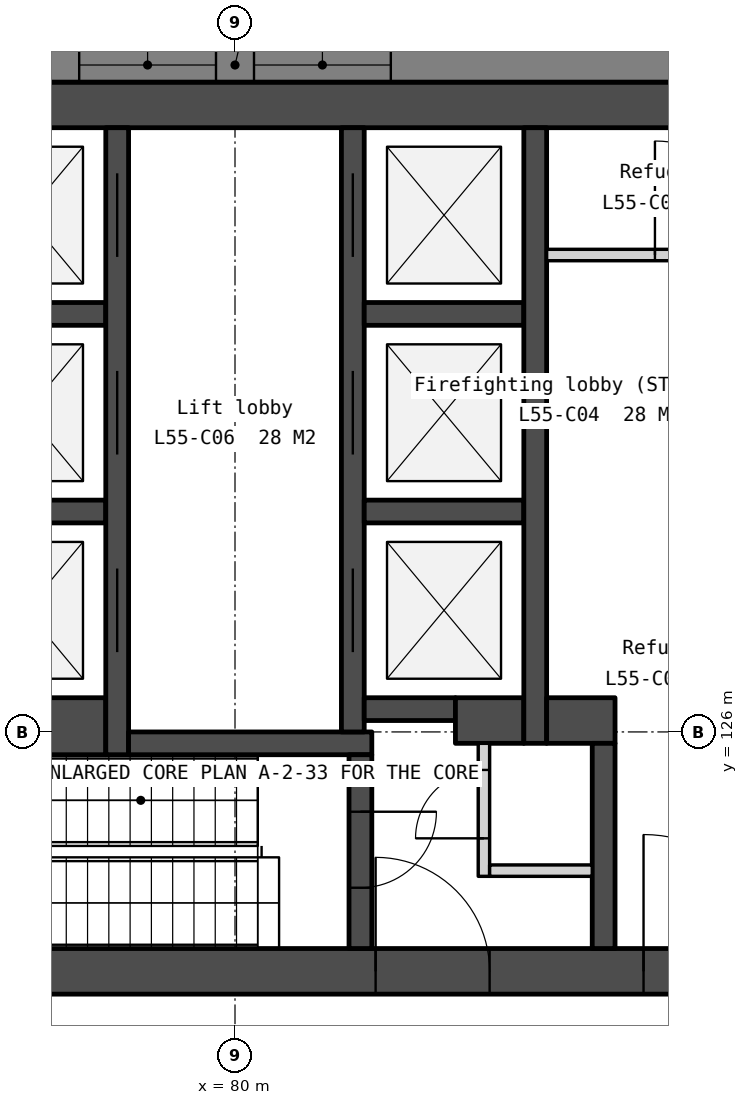
"""IFC4 building model, lengths in metres.
Left out: names, types, materials, properties, quantities, classifications, styles, units other than length and angle.
Written with IfcOpenShell. Run it as: python <this file> out.ifc"""

import sys

from ifc_helpers import new_model, si_unit, direction, frame, frame_2d, origin, place, context, subcontext, project, spatial, polyline, rectangle, outline, extrude, element, fill, save


model = new_model("IFC4")
c1 = context("Model", 3, precision=1e-05, world=origin(), true_north=direction((0.0, 1.0)))
c2 = subcontext(c1, "Body", "Model", "MODEL_VIEW")
j1 = project(units=[si_unit("LENGTHUNIT", "METRE"), si_unit("PLANEANGLEUNIT", "RADIAN")], contexts=[c1])
p1 = place(None, origin())
s1 = spatial("IfcSite", under=j1, at=p1, CompositionType="ELEMENT")
p2 = place(p1, origin())
s2 = spatial("IfcBuilding", under=s1, at=p2, CompositionType="ELEMENT")
p3 = place(p2, frame((0.0, 0.0, 219.2)))
s3 = spatial("IfcBuildingStorey", under=s2, at=p3, CompositionType="ELEMENT", Elevation=219.2)
p4 = place(p3, frame((69.0, 134.25, 0.0), z_axis=(0.0, 0.0, 1.0), x_axis=(1.0, 0.0, 0.0)))
e1 = element("IfcWall", 1, at=p4, inside=s3, PredefinedType="SOLIDWALL", context=c2, shape_type="SweptSolid", body=[
    extrude(rectangle(XDim=22.0, YDim=0.6, at=frame_2d((11.0, 0.0))), origin(), (0.0, 0.0, 1.0), 3.75),
])
p5 = place(p3, frame((69.0, 122.85, 0.0), z_axis=(0.0, 0.0, 1.0), x_axis=(1.0, 0.0, 0.0)))
e2 = element("IfcWall", 2, at=p5, inside=s3, PredefinedType="SOLIDWALL", context=c2, shape_type="SweptSolid", body=[
    extrude(rectangle(XDim=22.0, YDim=0.6, at=frame_2d((11.0, 0.0))), origin(), (0.0, 0.0, 1.0), 3.75),
])
p6 = place(p5, frame((16.375, 0.0, 0.0)))
e3 = element("IfcOpeningElement", 3, at=p6, cuts=e2, PredefinedType="OPENING", context=c2, shape_type="SweptSolid", body=[
    extrude(rectangle(XDim=1.8, YDim=2.1, at=frame_2d((0.9, 1.05))), frame((0.0, 0.31, 0.0), z_axis=(0.0, -1.0, 0.0), x_axis=(1.0, 0.0, 0.0)), (0.0, 0.0, 1.0), 0.62),
])
p7 = place(p5, frame((3.825, 0.0, 0.0)))
e4 = element("IfcOpeningElement", 4, at=p7, cuts=e2, PredefinedType="OPENING", context=c2, shape_type="SweptSolid", body=[
    extrude(rectangle(XDim=1.8, YDim=2.1, at=frame_2d((0.9, 1.05))), frame((0.0, 0.31, 0.0), z_axis=(0.0, -1.0, 0.0), x_axis=(1.0, 0.0, 0.0)), (0.0, 0.0, 1.0), 0.62),
])
p8 = place(p5, frame((12.85, 0.0, 0.0)))
e5 = element("IfcOpeningElement", 5, at=p8, cuts=e2, PredefinedType="OPENING", context=c2, shape_type="SweptSolid", body=[
    extrude(rectangle(XDim=1.5, YDim=2.1, at=frame_2d((0.75, 1.05))), frame((0.0, 0.31, 0.0), z_axis=(0.0, -1.0, 0.0), x_axis=(1.0, 0.0, 0.0)), (0.0, 0.0, 1.0), 0.62),
])
for number, where, z_axis, x_axis in (
    (6, (76.2, 131.5, 0.0), (0.0, 0.0, 1.0), (1.0, 0.0, 0.0)),
    (7, (76.2, 128.9, 0.0), (0.0, 0.0, 1.0), (1.0, 0.0, 0.0)),
):
    element("IfcWall", number, at=place(p3, frame(where, z_axis=z_axis, x_axis=x_axis)), inside=s3, PredefinedType="SOLIDWALL", context=c2, shape_type="SweptSolid", body=[
        extrude(rectangle(XDim=2.1, YDim=0.3, at=frame_2d((1.05, 0.0))), origin(), (0.0, 0.0, 1.0), 3.75),
    ])
p9 = place(p3, frame((76.2, 126.075, 0.0), z_axis=(0.0, 0.0, 1.0), x_axis=(1.0, 0.0, 0.0)))
e8 = element("IfcWall", 8, at=p9, inside=s3, PredefinedType="SOLIDWALL", context=c2, shape_type="SweptSolid", body=[
    extrude(rectangle(XDim=2.1, YDim=0.75, at=frame_2d((1.05, 0.0))), origin(), (0.0, 0.0, 1.0), 3.75),
])
p10 = place(p3, frame((78.45, 133.95, 0.0), z_axis=(0.0, 0.0, 1.0), x_axis=(0.0, -1.0, 0.0)))
e9 = element("IfcWall", 9, at=p10, inside=s3, PredefinedType="SOLIDWALL", context=c2, shape_type="SweptSolid", body=[
    extrude(rectangle(XDim=8.25, YDim=0.3, at=frame_2d((4.125, 0.0))), origin(), (0.0, 0.0, 1.0), 3.75),
])
p11 = place(p10, frame((0.6, 0.0, 0.0)))
e10 = element("IfcOpeningElement", 10, at=p11, cuts=e9, PredefinedType="OPENING", context=c2, shape_type="SweptSolid", body=[
    extrude(rectangle(XDim=1.1, YDim=2.1, at=frame_2d((0.55, 1.05))), frame((0.0, 0.16, 0.0), z_axis=(0.0, -1.0, 0.0), x_axis=(1.0, 0.0, 0.0)), (0.0, 0.0, 1.0), 0.32),
])
p12 = place(p10, frame((3.2, 0.0, 0.0)))
e11 = element("IfcOpeningElement", 11, at=p12, cuts=e9, PredefinedType="OPENING", context=c2, shape_type="SweptSolid", body=[
    extrude(rectangle(XDim=1.1, YDim=2.1, at=frame_2d((0.55, 1.05))), frame((0.0, 0.16, 0.0), z_axis=(0.0, -1.0, 0.0), x_axis=(1.0, 0.0, 0.0)), (0.0, 0.0, 1.0), 0.32),
])
p13 = place(p10, frame((5.8, 0.0, 0.0)))
e12 = element("IfcOpeningElement", 12, at=p13, cuts=e9, PredefinedType="OPENING", context=c2, shape_type="SweptSolid", body=[
    extrude(rectangle(XDim=1.1, YDim=2.1, at=frame_2d((0.55, 1.05))), frame((0.0, 0.16, 0.0), z_axis=(0.0, -1.0, 0.0), x_axis=(1.0, 0.0, 0.0)), (0.0, 0.0, 1.0), 0.32),
])
p14 = place(p3, frame((78.6, 125.85, 0.0), z_axis=(0.0, 0.0, 1.0), x_axis=(1.0, 0.0, 0.0)))
e13 = element("IfcWall", 13, at=p14, inside=s3, PredefinedType="SOLIDWALL", context=c2, shape_type="SweptSolid", body=[
    extrude(rectangle(XDim=3.2, YDim=0.3, at=frame_2d((1.6, 0.0))), origin(), (0.0, 0.0, 1.0), 3.75),
])
p15 = place(p3, frame((81.55, 133.95, 0.0), z_axis=(0.0, 0.0, 1.0), x_axis=(0.0, -1.0, 0.0)))
e14 = element("IfcWall", 14, at=p15, inside=s3, PredefinedType="SOLIDWALL", context=c2, shape_type="SweptSolid", body=[
    extrude(rectangle(XDim=7.95, YDim=0.3, at=frame_2d((3.975, 0.0))), origin(), (0.0, 0.0, 1.0), 3.75),
])
p16 = place(p15, frame((0.6, 0.0, 0.0)))
e15 = element("IfcOpeningElement", 15, at=p16, cuts=e14, PredefinedType="OPENING", context=c2, shape_type="SweptSolid", body=[
    extrude(rectangle(XDim=1.1, YDim=2.1, at=frame_2d((0.55, 1.05))), frame((0.0, 0.16, 0.0), z_axis=(0.0, -1.0, 0.0), x_axis=(1.0, 0.0, 0.0)), (0.0, 0.0, 1.0), 0.32),
])
p17 = place(p15, frame((3.2, 0.0, 0.0)))
e16 = element("IfcOpeningElement", 16, at=p17, cuts=e14, PredefinedType="OPENING", context=c2, shape_type="SweptSolid", body=[
    extrude(rectangle(XDim=1.1, YDim=2.1, at=frame_2d((0.55, 1.05))), frame((0.0, 0.16, 0.0), z_axis=(0.0, -1.0, 0.0), x_axis=(1.0, 0.0, 0.0)), (0.0, 0.0, 1.0), 0.32),
])
p18 = place(p15, frame((5.8, 0.0, 0.0)))
e17 = element("IfcOpeningElement", 17, at=p18, cuts=e14, PredefinedType="OPENING", context=c2, shape_type="SweptSolid", body=[
    extrude(rectangle(XDim=1.1, YDim=2.1, at=frame_2d((0.55, 1.05))), frame((0.0, 0.16, 0.0), z_axis=(0.0, -1.0, 0.0), x_axis=(1.0, 0.0, 0.0)), (0.0, 0.0, 1.0), 0.32),
])
p19 = place(p3, frame((81.65, 125.7, 0.0), z_axis=(0.0, 0.0, 1.0), x_axis=(0.0, -1.0, 0.0)))
e18 = element("IfcWall", 18, at=p19, inside=s3, PredefinedType="SOLIDWALL", context=c2, shape_type="SweptSolid", body=[
    extrude(rectangle(XDim=2.55, YDim=0.3, at=frame_2d((1.275, 0.0))), origin(), (0.0, 0.0, 1.0), 3.75),
])
p20 = place(p19, frame((0.75, 0.0, 0.0)))
e19 = element("IfcOpeningElement", 19, at=p20, cuts=e18, PredefinedType="OPENING", context=c2, shape_type="SweptSolid", body=[
    extrude(rectangle(XDim=1.0, YDim=2.1, at=frame_2d((0.5, 1.05))), frame((0.0, 0.16, 0.0), z_axis=(0.0, -1.0, 0.0), x_axis=(1.0, 0.0, 0.0)), (0.0, 0.0, 1.0), 0.32),
])
for number, where, z_axis, x_axis in (
    (20, (81.7, 131.5, 0.0), (0.0, 0.0, 1.0), (1.0, 0.0, 0.0)),
    (21, (81.7, 128.9, 0.0), (0.0, 0.0, 1.0), (1.0, 0.0, 0.0)),
):
    element("IfcWall", number, at=place(p3, frame(where, z_axis=z_axis, x_axis=x_axis)), inside=s3, PredefinedType="SOLIDWALL", context=c2, shape_type="SweptSolid", body=[
        extrude(rectangle(XDim=2.1, YDim=0.3, at=frame_2d((1.05, 0.0))), origin(), (0.0, 0.0, 1.0), 3.75),
    ])
p21 = place(p3, frame((81.7, 126.3, 0.0), z_axis=(0.0, 0.0, 1.0), x_axis=(1.0, 0.0, 0.0)))
e22 = element("IfcWall", 22, at=p21, inside=s3, PredefinedType="SOLIDWALL", context=c2, shape_type="SweptSolid", body=[
    extrude(rectangle(XDim=1.2, YDim=0.3, at=frame_2d((0.6, 0.0))), origin(), (0.0, 0.0, 1.0), 3.75),
])
p22 = place(p3, frame((82.9, 126.15, 0.0), z_axis=(0.0, 0.0, 1.0), x_axis=(1.0, 0.0, 0.0)))
e23 = element("IfcWall", 23, at=p22, inside=s3, PredefinedType="SOLIDWALL", context=c2, shape_type="SweptSolid", body=[
    extrude(rectangle(XDim=0.9, YDim=0.6, at=frame_2d((0.45, 0.0))), origin(), (0.0, 0.0, 1.0), 3.75),
])
p23 = place(p3, frame((83.275, 125.85, 0.0), z_axis=(0.0, 0.0, 1.0), x_axis=(0.0, -1.0, 0.0)))
e24 = element("IfcWall", 24, at=p23, inside=s3, PredefinedType="PARTITIONING", context=c2, shape_type="SweptSolid", body=[
    extrude(rectangle(XDim=1.75, YDim=0.15, at=frame_2d((0.875, 0.0))), origin(), (0.0, 0.0, 1.0), 3.75),
])
p24 = place(p23, frame((0.35, 0.0, 0.0)))
e25 = element("IfcOpeningElement", 25, at=p24, cuts=e24, PredefinedType="OPENING", context=c2, shape_type="SweptSolid", body=[
    extrude(rectangle(XDim=0.9, YDim=2.1, at=frame_2d((0.45, 1.05))), frame((0.0, 0.085, 0.0), z_axis=(0.0, -1.0, 0.0), x_axis=(1.0, 0.0, 0.0)), (0.0, 0.0, 1.0), 0.17),
])
p25 = place(p3, frame((83.35, 124.175, 0.0), z_axis=(0.0, 0.0, 1.0), x_axis=(1.0, 0.0, 0.0)))
e26 = element("IfcWall", 26, at=p25, inside=s3, PredefinedType="PARTITIONING", context=c2, shape_type="SweptSolid", body=[
    extrude(rectangle(XDim=1.35, YDim=0.15, at=frame_2d((0.675, 0.0))), origin(), (0.0, 0.0, 1.0), 3.75),
])
p26 = place(p3, frame((83.95, 133.95, 0.0), z_axis=(0.0, 0.0, 1.0), x_axis=(0.0, -1.0, 0.0)))
e27 = element("IfcWall", 27, at=p26, inside=s3, PredefinedType="SOLIDWALL", context=c2, shape_type="SweptSolid", body=[
    extrude(rectangle(XDim=8.1, YDim=0.3, at=frame_2d((4.05, 0.0))), origin(), (0.0, 0.0, 1.0), 3.75),
])
p27 = place(p3, frame((84.1, 132.275, 0.0), z_axis=(0.0, 0.0, 1.0), x_axis=(1.0, 0.0, 0.0)))
e28 = element("IfcWall", 28, at=p27, inside=s3, PredefinedType="PARTITIONING", context=c2, shape_type="SweptSolid", body=[
    extrude(rectangle(XDim=3.45, YDim=0.15, at=frame_2d((1.725, 0.0))), origin(), (0.0, 0.0, 1.0), 3.75),
])
p28 = place(p27, frame((1.425, 0.0, 0.0)))
e29 = element("IfcOpeningElement", 29, at=p28, cuts=e28, PredefinedType="OPENING", context=c2, shape_type="SweptSolid", body=[
    extrude(rectangle(XDim=1.5, YDim=2.1, at=frame_2d((0.75, 1.05))), frame((0.0, 0.085, 0.0), z_axis=(0.0, -1.0, 0.0), x_axis=(1.0, 0.0, 0.0)), (0.0, 0.0, 1.0), 0.17),
])
p29 = place(p3, frame((84.1, 126.15, 0.0), z_axis=(0.0, 0.0, 1.0), x_axis=(1.0, 0.0, 0.0)))
e30 = element("IfcWall", 30, at=p29, inside=s3, PredefinedType="SOLIDWALL", context=c2, shape_type="SweptSolid", body=[
    extrude(rectangle(XDim=0.9, YDim=0.6, at=frame_2d((0.45, 0.0))), origin(), (0.0, 0.0, 1.0), 3.75),
])
p30 = place(p3, frame((84.85, 125.85, 0.0), z_axis=(0.0, 0.0, 1.0), x_axis=(0.0, -1.0, 0.0)))
e31 = element("IfcWall", 31, at=p30, inside=s3, PredefinedType="SOLIDWALL", context=c2, shape_type="SweptSolid", body=[
    extrude(rectangle(XDim=2.7, YDim=0.3, at=frame_2d((1.35, 0.0))), origin(), (0.0, 0.0, 1.0), 3.75),
])
p31 = place(p3, frame((99.365, 134.775, -0.15), z_axis=(0.0, 0.0, 1.0), x_axis=(-1.0, 0.0, 0.0)))
e32 = element("IfcWall", 32, at=p31, inside=s3, PredefinedType="SOLIDWALL", context=c2, shape_type="SweptSolid", body=[
    extrude(outline(polyline([(38.729, 0.0), (38.729, 3.9), (0.0, 3.9), (0.0, 0.0), (38.729, 0.0)])), frame((0.0, 0.225, 0.0), z_axis=(0.0, -1.0, 0.0), x_axis=(1.0, 0.0, 0.0)), (0.0, 0.0, 1.0), 0.45),
])
p32 = place(p31, frame((0.807, 0.0, 0.95)))
e33 = element("IfcOpeningElement", 33, at=p32, cuts=e32, PredefinedType="OPENING", context=c2, shape_type="SweptSolid", body=[
    extrude(rectangle(XDim=1.2, YDim=2.2, at=frame_2d((0.6, 1.1))), frame((0.0, 0.235, 0.0), z_axis=(0.0, -1.0, 0.0), x_axis=(1.0, 0.0, 0.0)), (0.0, 0.0, 1.0), 0.47),
])
p33 = place(p31, frame((7.632, 0.0, 0.95)))
e34 = element("IfcOpeningElement", 34, at=p33, cuts=e32, PredefinedType="OPENING", context=c2, shape_type="SweptSolid", body=[
    extrude(rectangle(XDim=1.8, YDim=2.2, at=frame_2d((0.9, 1.1))), frame((0.0, 0.235, 0.0), z_axis=(0.0, -1.0, 0.0), x_axis=(1.0, 0.0, 0.0)), (0.0, 0.0, 1.0), 0.47),
])
p34 = place(p31, frame((9.932, 0.0, 0.95)))
e35 = element("IfcOpeningElement", 35, at=p34, cuts=e32, PredefinedType="OPENING", context=c2, shape_type="SweptSolid", body=[
    extrude(rectangle(XDim=1.8, YDim=2.2, at=frame_2d((0.9, 1.1))), frame((0.0, 0.235, 0.0), z_axis=(0.0, -1.0, 0.0), x_axis=(1.0, 0.0, 0.0)), (0.0, 0.0, 1.0), 0.47),
])
p35 = place(p31, frame((17.315, 0.0, 0.95)))
e36 = element("IfcOpeningElement", 36, at=p35, cuts=e32, PredefinedType="OPENING", context=c2, shape_type="SweptSolid", body=[
    extrude(rectangle(XDim=1.8, YDim=2.2, at=frame_2d((0.9, 1.1))), frame((0.0, 0.235, 0.0), z_axis=(0.0, -1.0, 0.0), x_axis=(1.0, 0.0, 0.0)), (0.0, 0.0, 1.0), 0.47),
])
p36 = place(p31, frame((19.615, 0.0, 0.95)))
e37 = element("IfcOpeningElement", 37, at=p36, cuts=e32, PredefinedType="OPENING", context=c2, shape_type="SweptSolid", body=[
    extrude(rectangle(XDim=1.8, YDim=2.2, at=frame_2d((0.9, 1.1))), frame((0.0, 0.235, 0.0), z_axis=(0.0, -1.0, 0.0), x_axis=(1.0, 0.0, 0.0)), (0.0, 0.0, 1.0), 0.47),
])
p37 = place(p31, frame((26.997, 0.0, 0.95)))
e38 = element("IfcOpeningElement", 38, at=p37, cuts=e32, PredefinedType="OPENING", context=c2, shape_type="SweptSolid", body=[
    extrude(rectangle(XDim=1.8, YDim=2.2, at=frame_2d((0.9, 1.1))), frame((0.0, 0.235, 0.0), z_axis=(0.0, -1.0, 0.0), x_axis=(1.0, 0.0, 0.0)), (0.0, 0.0, 1.0), 0.47),
])
p38 = place(p31, frame((29.297, 0.0, 0.95)))
e39 = element("IfcOpeningElement", 39, at=p38, cuts=e32, PredefinedType="OPENING", context=c2, shape_type="SweptSolid", body=[
    extrude(rectangle(XDim=1.8, YDim=2.2, at=frame_2d((0.9, 1.1))), frame((0.0, 0.235, 0.0), z_axis=(0.0, -1.0, 0.0), x_axis=(1.0, 0.0, 0.0)), (0.0, 0.0, 1.0), 0.47),
])
p39 = place(p31, frame((36.722, 0.0, 0.95)))
e40 = element("IfcOpeningElement", 40, at=p39, cuts=e32, PredefinedType="OPENING", context=c2, shape_type="SweptSolid", body=[
    extrude(rectangle(XDim=1.2, YDim=2.2, at=frame_2d((0.6, 1.1))), frame((0.0, 0.235, 0.0), z_axis=(0.0, -1.0, 0.0), x_axis=(1.0, 0.0, 0.0)), (0.0, 0.0, 1.0), 0.47),
])
p40 = place(p3, frame((59.13, 132.168, -0.15), z_axis=(0.0, 0.0, 1.0), x_axis=(0.500002199942, -0.866024133644, 0.0)))
e41 = element("IfcWall", 41, at=p40, inside=s3, PredefinedType="SOLIDWALL", context=c2, shape_type="SweptSolid", body=[
    extrude(outline(polyline([(38.729, 0.0), (38.729, 3.9), (0.0, 3.9), (0.0, 0.0), (38.729, 0.0)])), frame((0.0, 0.225, 0.0), z_axis=(0.0, -1.0, 0.0), x_axis=(1.0, 0.0, 0.0)), (0.0, 0.0, 1.0), 0.45),
])
p41 = place(p40, frame((0.807, 0.0, 0.95)))
e42 = element("IfcOpeningElement", 42, at=p41, cuts=e41, PredefinedType="OPENING", context=c2, shape_type="SweptSolid", body=[
    extrude(rectangle(XDim=1.2, YDim=2.2, at=frame_2d((0.6, 1.1))), frame((0.0, 0.235, 0.0), z_axis=(0.0, -1.0, 0.0), x_axis=(1.0, 0.0, 0.0)), (0.0, 0.0, 1.0), 0.47),
])
p42 = place(p40, frame((7.632, 0.0, 0.95)))
e43 = element("IfcOpeningElement", 43, at=p42, cuts=e41, PredefinedType="OPENING", context=c2, shape_type="SweptSolid", body=[
    extrude(rectangle(XDim=1.8, YDim=2.2, at=frame_2d((0.9, 1.1))), frame((0.0, 0.235, 0.0), z_axis=(0.0, -1.0, 0.0), x_axis=(1.0, 0.0, 0.0)), (0.0, 0.0, 1.0), 0.47),
])
p43 = place(p40, frame((9.932, 0.0, 0.95)))
e44 = element("IfcOpeningElement", 44, at=p43, cuts=e41, PredefinedType="OPENING", context=c2, shape_type="SweptSolid", body=[
    extrude(rectangle(XDim=1.8, YDim=2.2, at=frame_2d((0.9, 1.1))), frame((0.0, 0.235, 0.0), z_axis=(0.0, -1.0, 0.0), x_axis=(1.0, 0.0, 0.0)), (0.0, 0.0, 1.0), 0.47),
])
p44 = place(p40, frame((17.315, 0.0, 0.95)))
e45 = element("IfcOpeningElement", 45, at=p44, cuts=e41, PredefinedType="OPENING", context=c2, shape_type="SweptSolid", body=[
    extrude(rectangle(XDim=1.8, YDim=2.2, at=frame_2d((0.9, 1.1))), frame((0.0, 0.235, 0.0), z_axis=(0.0, -1.0, 0.0), x_axis=(1.0, 0.0, 0.0)), (0.0, 0.0, 1.0), 0.47),
])
p45 = place(p40, frame((19.615, 0.0, 0.95)))
e46 = element("IfcOpeningElement", 46, at=p45, cuts=e41, PredefinedType="OPENING", context=c2, shape_type="SweptSolid", body=[
    extrude(rectangle(XDim=1.8, YDim=2.2, at=frame_2d((0.9, 1.1))), frame((0.0, 0.235, 0.0), z_axis=(0.0, -1.0, 0.0), x_axis=(1.0, 0.0, 0.0)), (0.0, 0.0, 1.0), 0.47),
])
p46 = place(p40, frame((26.997, 0.0, 0.95)))
e47 = element("IfcOpeningElement", 47, at=p46, cuts=e41, PredefinedType="OPENING", context=c2, shape_type="SweptSolid", body=[
    extrude(rectangle(XDim=1.8, YDim=2.2, at=frame_2d((0.9, 1.1))), frame((0.0, 0.235, 0.0), z_axis=(0.0, -1.0, 0.0), x_axis=(1.0, 0.0, 0.0)), (0.0, 0.0, 1.0), 0.47),
])
p47 = place(p40, frame((29.297, 0.0, 0.95)))
e48 = element("IfcOpeningElement", 48, at=p47, cuts=e41, PredefinedType="OPENING", context=c2, shape_type="SweptSolid", body=[
    extrude(rectangle(XDim=1.8, YDim=2.2, at=frame_2d((0.9, 1.1))), frame((0.0, 0.235, 0.0), z_axis=(0.0, -1.0, 0.0), x_axis=(1.0, 0.0, 0.0)), (0.0, 0.0, 1.0), 0.47),
])
p48 = place(p40, frame((36.722, 0.0, 0.95)))
e49 = element("IfcOpeningElement", 49, at=p48, cuts=e41, PredefinedType="OPENING", context=c2, shape_type="SweptSolid", body=[
    extrude(rectangle(XDim=1.2, YDim=2.2, at=frame_2d((0.6, 1.1))), frame((0.0, 0.235, 0.0), z_axis=(0.0, -1.0, 0.0), x_axis=(1.0, 0.0, 0.0)), (0.0, 0.0, 1.0), 0.47),
])
p49 = place(p11, origin())
e50 = element("IfcDoor", 50, at=p49, inside=s3, OperationType="SLIDING_TO_RIGHT", PredefinedType="DOOR", context=c2, shape_type="SweptSolid", body=[
    extrude(rectangle(XDim=1.1, YDim=2.1, at=frame_2d((0.55, 1.05))), frame((0.0, 0.025, 0.0), z_axis=(0.0, -1.0, 0.0), x_axis=(1.0, 0.0, 0.0)), (0.0, 0.0, 1.0), 0.05),
])
fill(e10, e50)
p50 = place(p12, origin())
e51 = element("IfcDoor", 51, at=p50, inside=s3, OperationType="SLIDING_TO_RIGHT", PredefinedType="DOOR", context=c2, shape_type="SweptSolid", body=[
    extrude(rectangle(XDim=1.1, YDim=2.1, at=frame_2d((0.55, 1.05))), frame((0.0, 0.025, 0.0), z_axis=(0.0, -1.0, 0.0), x_axis=(1.0, 0.0, 0.0)), (0.0, 0.0, 1.0), 0.05),
])
fill(e11, e51)
p51 = place(p13, origin())
e52 = element("IfcDoor", 52, at=p51, inside=s3, OperationType="SLIDING_TO_RIGHT", PredefinedType="DOOR", context=c2, shape_type="SweptSolid", body=[
    extrude(rectangle(XDim=1.1, YDim=2.1, at=frame_2d((0.55, 1.05))), frame((0.0, 0.025, 0.0), z_axis=(0.0, -1.0, 0.0), x_axis=(1.0, 0.0, 0.0)), (0.0, 0.0, 1.0), 0.05),
])
fill(e12, e52)
p52 = place(p16, origin())
e53 = element("IfcDoor", 53, at=p52, inside=s3, OperationType="SLIDING_TO_LEFT", PredefinedType="DOOR", context=c2, shape_type="SweptSolid", body=[
    extrude(rectangle(XDim=1.1, YDim=2.1, at=frame_2d((0.55, 1.05))), frame((0.0, 0.025, 0.0), z_axis=(0.0, -1.0, 0.0), x_axis=(1.0, 0.0, 0.0)), (0.0, 0.0, 1.0), 0.05),
])
fill(e15, e53)
p53 = place(p17, origin())
e54 = element("IfcDoor", 54, at=p53, inside=s3, OperationType="SLIDING_TO_LEFT", PredefinedType="DOOR", context=c2, shape_type="SweptSolid", body=[
    extrude(rectangle(XDim=1.1, YDim=2.1, at=frame_2d((0.55, 1.05))), frame((0.0, 0.025, 0.0), z_axis=(0.0, -1.0, 0.0), x_axis=(1.0, 0.0, 0.0)), (0.0, 0.0, 1.0), 0.05),
])
fill(e16, e54)
p54 = place(p18, origin())
e55 = element("IfcDoor", 55, at=p54, inside=s3, OperationType="SLIDING_TO_LEFT", PredefinedType="DOOR", context=c2, shape_type="SweptSolid", body=[
    extrude(rectangle(XDim=1.1, YDim=2.1, at=frame_2d((0.55, 1.05))), frame((0.0, 0.025, 0.0), z_axis=(0.0, -1.0, 0.0), x_axis=(1.0, 0.0, 0.0)), (0.0, 0.0, 1.0), 0.05),
])
fill(e17, e55)
p55 = place(p6, origin())
e56 = element("IfcDoor", 56, at=p55, inside=s3, OperationType="DOUBLE_DOOR_DOUBLE_SWING", PredefinedType="DOOR", context=c2, shape_type="SweptSolid", body=[
    extrude(rectangle(XDim=1.8, YDim=2.1, at=frame_2d((0.9, 1.05))), frame((0.0, 0.025, 0.0), z_axis=(0.0, -1.0, 0.0), x_axis=(1.0, 0.0, 0.0)), (0.0, 0.0, 1.0), 0.05),
])
fill(e3, e56)
p56 = place(p8, origin())
e57 = element("IfcDoor", 57, at=p56, inside=s3, OperationType="DOUBLE_DOOR_DOUBLE_SWING", PredefinedType="DOOR", context=c2, shape_type="SweptSolid", body=[
    extrude(rectangle(XDim=1.5, YDim=2.1, at=frame_2d((0.75, 1.05))), frame((0.0, 0.025, 0.0), z_axis=(0.0, -1.0, 0.0), x_axis=(1.0, 0.0, 0.0)), (0.0, 0.0, 1.0), 0.05),
])
fill(e5, e57)
p57 = place(p24, origin())
e58 = element("IfcDoor", 58, at=p57, inside=s3, OperationType="SINGLE_SWING_RIGHT", PredefinedType="DOOR", context=c2, shape_type="SweptSolid", body=[
    extrude(rectangle(XDim=0.9, YDim=2.1, at=frame_2d((0.45, 1.05))), frame((0.0, 0.025, 0.0), z_axis=(0.0, -1.0, 0.0), x_axis=(1.0, 0.0, 0.0)), (0.0, 0.0, 1.0), 0.05),
])
fill(e25, e58)
p58 = place(p28, origin())
e59 = element("IfcDoor", 59, at=p58, inside=s3, OperationType="DOUBLE_DOOR_DOUBLE_SWING", PredefinedType="DOOR", context=c2, shape_type="SweptSolid", body=[
    extrude(rectangle(XDim=1.5, YDim=2.1, at=frame_2d((0.75, 1.05))), frame((0.0, 0.025, 0.0), z_axis=(0.0, -1.0, 0.0), x_axis=(1.0, 0.0, 0.0)), (0.0, 0.0, 1.0), 0.05),
])
fill(e29, e59)
p59 = place(p20, origin())
e60 = element("IfcDoor", 60, at=p59, inside=s3, OperationType="SINGLE_SWING_LEFT", PredefinedType="DOOR", context=c2, shape_type="SweptSolid", body=[
    extrude(rectangle(XDim=1.0, YDim=2.1, at=frame_2d((0.5, 1.05))), frame((0.0, 0.025, 0.0), z_axis=(0.0, -1.0, 0.0), x_axis=(1.0, 0.0, 0.0)), (0.0, 0.0, 1.0), 0.05),
])
fill(e19, e60)
p60 = place(p35, origin())
e61 = element("IfcWindow", 61, at=p60, inside=s3, PartitioningType="SINGLE_PANEL", PredefinedType="WINDOW", context=c2, shape_type="SweptSolid", body=[
    extrude(rectangle(XDim=1.8, YDim=2.2, at=frame_2d((0.9, 1.1))), frame((0.0, 0.03, 0.0), z_axis=(0.0, -1.0, 0.0), x_axis=(1.0, 0.0, 0.0)), (0.0, 0.0, 1.0), 0.06),
])
fill(e36, e61)
p61 = place(p36, origin())
e62 = element("IfcWindow", 62, at=p61, inside=s3, PartitioningType="SINGLE_PANEL", PredefinedType="WINDOW", context=c2, shape_type="SweptSolid", body=[
    extrude(rectangle(XDim=1.8, YDim=2.2, at=frame_2d((0.9, 1.1))), frame((0.0, 0.03, 0.0), z_axis=(0.0, -1.0, 0.0), x_axis=(1.0, 0.0, 0.0)), (0.0, 0.0, 1.0), 0.06),
])
fill(e37, e62)
save(model, sys.argv[1])
